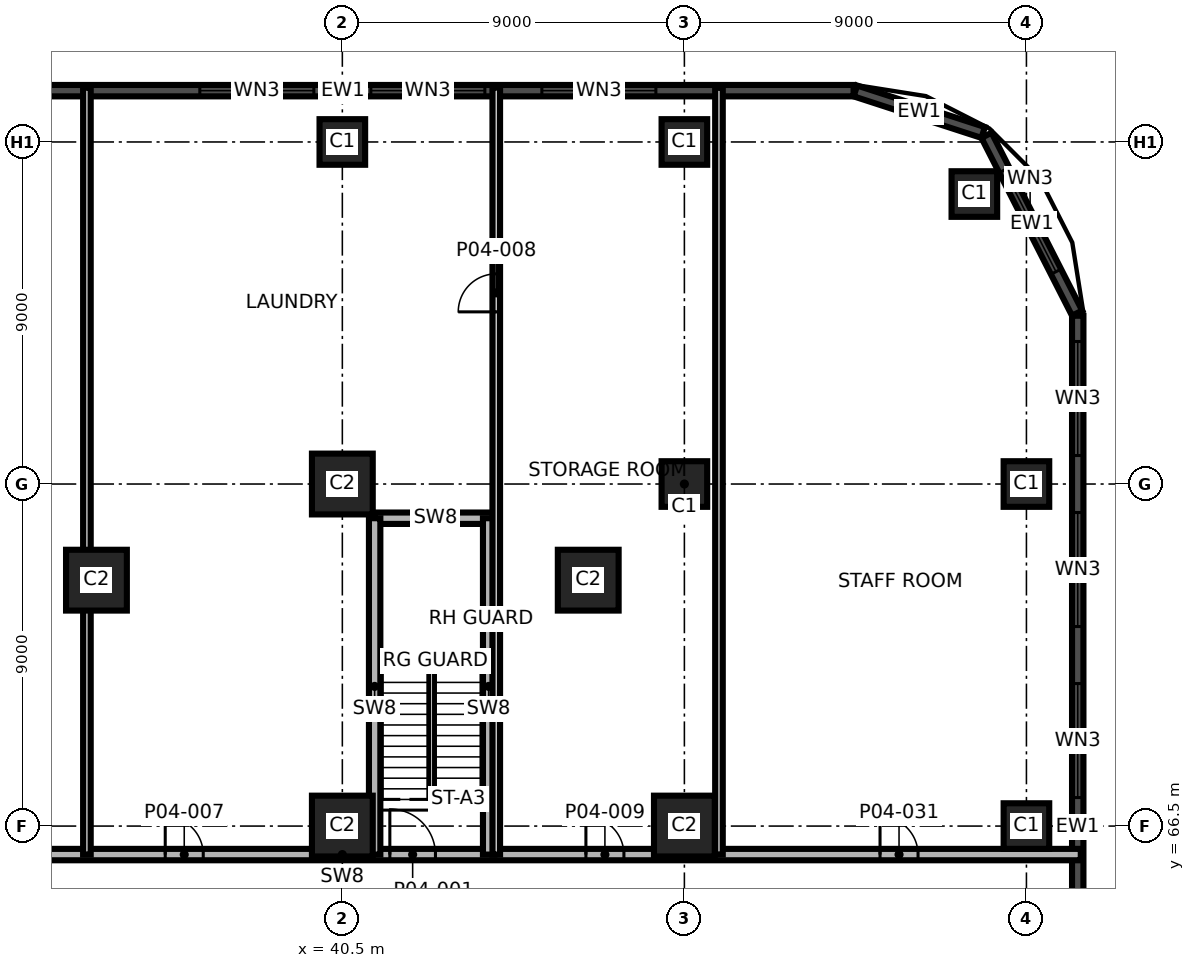
"""IFC4 building model, lengths in metres.
Left out: names, types, materials, properties, quantities, classifications, styles, units other than length and angle.
Written with IfcOpenShell. Run it as: python <this file> out.ifc"""

import sys

from ifc_helpers import new_model, si_unit, direction, frame, frame_2d, origin, origin_2d, place, context, subcontext, project, spatial, rectangle, extrude, element, fill, save


model = new_model("IFC4")
c1 = context("Model", 3, precision=1e-05, world=origin(), true_north=direction((0.0, 1.0)))
c2 = subcontext(c1, "Body", "Model", "MODEL_VIEW")
j1 = project(units=[si_unit("LENGTHUNIT", "METRE"), si_unit("PLANEANGLEUNIT", "RADIAN")], contexts=[c1])
p1 = place(None, origin())
s1 = spatial("IfcSite", under=j1, at=p1, CompositionType="ELEMENT")
p2 = place(p1, origin())
s2 = spatial("IfcBuilding", under=s1, at=p2, CompositionType="ELEMENT")
p3 = place(p2, frame((0.0, 0.0, 23.5)))
s3 = spatial("IfcBuildingStorey", under=s2, at=p3, CompositionType="ELEMENT", Elevation=23.5)
for number, where, z_axis, x_axis in (
    (1, (40.5, 66.5, 0.0), (0.0, 0.0, 1.0), (1.0, 0.0, 0.0)),
    (2, (49.5, 66.5, 0.0), (0.0, 0.0, 1.0), (1.0, 0.0, 0.0)),
):
    element("IfcColumn", number, at=place(p3, frame(where, z_axis=z_axis, x_axis=x_axis)), inside=s3, PredefinedType="COLUMN", context=c2, shape_type="SweptSolid", body=[
        extrude(rectangle(XDim=1.6, YDim=1.6, at=origin_2d()), origin(), (0.0, 0.0, 1.0), 5.0),
    ])
p4 = place(p3, frame((58.5, 66.5, 0.0), z_axis=(0.0, 0.0, 1.0), x_axis=(1.0, 0.0, 0.0)))
e3 = element("IfcColumn", 3, at=p4, inside=s3, PredefinedType="COLUMN", context=c2, shape_type="SweptSolid", body=[
    extrude(rectangle(XDim=1.2, YDim=1.2, at=origin_2d()), origin(), (0.0, 0.0, 1.0), 5.0),
])
p5 = place(p3, frame((40.5, 75.5, 0.0), z_axis=(0.0, 0.0, 1.0), x_axis=(1.0, 0.0, 0.0)))
e4 = element("IfcColumn", 4, at=p5, inside=s3, PredefinedType="COLUMN", context=c2, shape_type="SweptSolid", body=[
    extrude(rectangle(XDim=1.6, YDim=1.6, at=origin_2d()), origin(), (0.0, 0.0, 1.0), 5.0),
])
for number, where, z_axis, x_axis in (
    (5, (49.5, 75.5, 0.0), (0.0, 0.0, 1.0), (1.0, 0.0, 0.0)),
    (6, (58.5, 75.5, 0.0), (0.0, 0.0, 1.0), (1.0, 0.0, 0.0)),
    (7, (57.13, 83.13, 0.0), (0.0, 0.0, 1.0), (1.0, 0.0, 0.0)),
    (8, (40.5, 84.5, 0.0), (0.0, 0.0, 1.0), (1.0, 0.0, 0.0)),
    (9, (49.5, 84.5, 0.0), (0.0, 0.0, 1.0), (1.0, 0.0, 0.0)),
):
    element("IfcColumn", number, at=place(p3, frame(where, z_axis=z_axis, x_axis=x_axis)), inside=s3, PredefinedType="COLUMN", context=c2, shape_type="SweptSolid", body=[
        extrude(rectangle(XDim=1.2, YDim=1.2, at=origin_2d()), origin(), (0.0, 0.0, 1.0), 5.0),
    ])
for number, where, z_axis, x_axis in (
    (10, (34.03, 72.97, 0.0), (0.0, 0.0, 1.0), (1.0, 0.0, 0.0)),
    (11, (46.97, 72.97, 0.0), (0.0, 0.0, 1.0), (1.0, 0.0, 0.0)),
):
    element("IfcColumn", number, at=place(p3, frame(where, z_axis=z_axis, x_axis=x_axis)), inside=s3, PredefinedType="COLUMN", context=c2, shape_type="SweptSolid", body=[
        extrude(rectangle(XDim=1.6, YDim=1.6, at=origin_2d()), origin(), (0.0, 0.0, 1.0), 5.0),
    ])
p6 = place(p3, frame((59.85, 53.0, 0.0), z_axis=(0.0, 0.0, 1.0), x_axis=(0.0, 1.0, 0.0)))
e12 = element("IfcWall", 12, at=p6, inside=s3, PredefinedType="SOLIDWALL", context=c2, shape_type="SweptSolid", body=[
    extrude(rectangle(XDim=26.928, YDim=0.3, at=frame_2d((13.464, 0.0))), origin(), (0.0, 0.0, 1.0), 4.7),
])
p7 = place(p6, frame((5.25, 0.0, 0.9)))
e13 = element("IfcOpeningElement", 13, at=p7, cuts=e12, PredefinedType="OPENING", context=c2, shape_type="SweptSolid", body=[
    extrude(rectangle(XDim=3.0, YDim=2.4, at=frame_2d((1.5, 1.2))), frame((0.0, 0.16, 0.0), z_axis=(0.0, -1.0, 0.0), x_axis=(1.0, 0.0, 0.0)), (0.0, 0.0, 1.0), 0.32),
])
p8 = place(p6, frame((14.25, 0.0, 0.9)))
e14 = element("IfcOpeningElement", 14, at=p8, cuts=e12, PredefinedType="OPENING", context=c2, shape_type="SweptSolid", body=[
    extrude(rectangle(XDim=3.0, YDim=2.4, at=frame_2d((1.5, 1.2))), frame((0.0, 0.16, 0.0), z_axis=(0.0, -1.0, 0.0), x_axis=(1.0, 0.0, 0.0)), (0.0, 0.0, 1.0), 0.32),
])
p9 = place(p6, frame((18.75, 0.0, 0.9)))
e15 = element("IfcOpeningElement", 15, at=p9, cuts=e12, PredefinedType="OPENING", context=c2, shape_type="SweptSolid", body=[
    extrude(rectangle(XDim=3.0, YDim=2.4, at=frame_2d((1.5, 1.2))), frame((0.0, 0.16, 0.0), z_axis=(0.0, -1.0, 0.0), x_axis=(1.0, 0.0, 0.0)), (0.0, 0.0, 1.0), 0.32),
])
p10 = place(p6, frame((23.25, 0.0, 0.9)))
e16 = element("IfcOpeningElement", 16, at=p10, cuts=e12, PredefinedType="OPENING", context=c2, shape_type="SweptSolid", body=[
    extrude(rectangle(XDim=3.0, YDim=2.4, at=frame_2d((1.5, 1.2))), frame((0.0, 0.16, 0.0), z_axis=(0.0, -1.0, 0.0), x_axis=(1.0, 0.0, 0.0)), (0.0, 0.0, 1.0), 0.32),
])
p11 = place(p3, frame((59.834, 79.996, 0.0), z_axis=(0.0, 0.0, 1.0), x_axis=(-0.454006562826, 0.890998339455, 0.0)))
e17 = element("IfcWall", 17, at=p11, inside=s3, PredefinedType="SOLIDWALL", context=c2, shape_type="SweptSolid", body=[
    extrude(rectangle(XDim=5.252, YDim=0.3, at=frame_2d((2.626, 0.0))), origin(), (0.0, 0.0, 1.0), 4.7),
])
p12 = place(p11, frame((1.224, 0.0, 0.9)))
e18 = element("IfcOpeningElement", 18, at=p12, cuts=e17, PredefinedType="OPENING", context=c2, shape_type="SweptSolid", body=[
    extrude(rectangle(XDim=3.0, YDim=2.4, at=frame_2d((1.5, 1.2))), frame((0.0, 0.16, 0.0), z_axis=(0.0, -1.0, 0.0), x_axis=(1.0, 0.0, 0.0)), (0.0, 0.0, 1.0), 0.32),
])
p13 = place(p3, frame((57.362, 84.75, 0.0), z_axis=(0.0, 0.0, 1.0), x_axis=(-0.951038127287, 0.309073584194, 0.0)))
e19 = element("IfcWall", 19, at=p13, inside=s3, PredefinedType="SOLIDWALL", context=c2, shape_type="SweptSolid", body=[
    extrude(rectangle(XDim=3.536, YDim=0.3, at=frame_2d((1.768, 0.0))), origin(), (0.0, 0.0, 1.0), 4.7),
])
p14 = place(p3, frame((53.952, 85.85, 0.0), z_axis=(0.0, 0.0, 1.0), x_axis=(-1.0, 0.0, 0.0)))
e20 = element("IfcWall", 20, at=p14, inside=s3, PredefinedType="SOLIDWALL", context=c2, shape_type="SweptSolid", body=[
    extrude(rectangle(XDim=26.88, YDim=0.3, at=frame_2d((13.44, 0.0))), origin(), (0.0, 0.0, 1.0), 4.7),
])
p15 = place(p14, frame((5.202, 0.0, 0.9)))
e21 = element("IfcOpeningElement", 21, at=p15, cuts=e20, PredefinedType="OPENING", context=c2, shape_type="SweptSolid", body=[
    extrude(rectangle(XDim=3.0, YDim=2.4, at=frame_2d((1.5, 1.2))), frame((0.0, 0.16, 0.0), z_axis=(0.0, -1.0, 0.0), x_axis=(1.0, 0.0, 0.0)), (0.0, 0.0, 1.0), 0.32),
])
p16 = place(p14, frame((9.702, 0.0, 0.9)))
e22 = element("IfcOpeningElement", 22, at=p16, cuts=e20, PredefinedType="OPENING", context=c2, shape_type="SweptSolid", body=[
    extrude(rectangle(XDim=3.0, YDim=2.4, at=frame_2d((1.5, 1.2))), frame((0.0, 0.16, 0.0), z_axis=(0.0, -1.0, 0.0), x_axis=(1.0, 0.0, 0.0)), (0.0, 0.0, 1.0), 0.32),
])
p17 = place(p14, frame((14.202, 0.0, 0.9)))
e23 = element("IfcOpeningElement", 23, at=p17, cuts=e20, PredefinedType="OPENING", context=c2, shape_type="SweptSolid", body=[
    extrude(rectangle(XDim=3.0, YDim=2.4, at=frame_2d((1.5, 1.2))), frame((0.0, 0.16, 0.0), z_axis=(0.0, -1.0, 0.0), x_axis=(1.0, 0.0, 0.0)), (0.0, 0.0, 1.0), 0.32),
])
p18 = place(p14, frame((23.226, 0.0, 0.9)))
e24 = element("IfcOpeningElement", 24, at=p18, cuts=e20, PredefinedType="OPENING", context=c2, shape_type="SweptSolid", body=[
    extrude(rectangle(XDim=3.0, YDim=2.4, at=frame_2d((1.5, 1.2))), frame((0.0, 0.16, 0.0), z_axis=(0.0, -1.0, 0.0), x_axis=(1.0, 0.0, 0.0)), (0.0, 0.0, 1.0), 0.32),
])
p19 = place(p3, frame((21.07, 65.75, 0.0), z_axis=(0.0, 0.0, 1.0), x_axis=(1.0, 0.0, 0.0)))
e25 = element("IfcWall", 25, at=p19, inside=s3, PredefinedType="SHEAR", context=c2, shape_type="SweptSolid", body=[
    extrude(rectangle(XDim=38.86, YDim=0.3, at=frame_2d((19.43, 0.0))), origin(), (0.0, 0.0, 1.0), 4.7),
])
p20 = place(p19, frame((20.68, 0.0, 0.0)))
e26 = element("IfcOpeningElement", 26, at=p20, cuts=e25, PredefinedType="OPENING", context=c2, shape_type="SweptSolid", body=[
    extrude(rectangle(XDim=1.2, YDim=2.1, at=frame_2d((0.6, 1.05))), frame((0.0, 0.16, 0.0), z_axis=(0.0, -1.0, 0.0), x_axis=(1.0, 0.0, 0.0)), (0.0, 0.0, 1.0), 0.32),
])
p21 = place(p19, frame((14.77, 0.0, 0.0)))
e27 = element("IfcOpeningElement", 27, at=p21, cuts=e25, PredefinedType="OPENING", context=c2, shape_type="SweptSolid", body=[
    extrude(rectangle(XDim=1.0, YDim=2.1, at=frame_2d((0.5, 1.05))), frame((0.0, 0.16, 0.0), z_axis=(0.0, -1.0, 0.0), x_axis=(1.0, 0.0, 0.0)), (0.0, 0.0, 1.0), 0.32),
])
p22 = place(p19, frame((25.839, 0.0, 0.0)))
e28 = element("IfcOpeningElement", 28, at=p22, cuts=e25, PredefinedType="OPENING", context=c2, shape_type="SweptSolid", body=[
    extrude(rectangle(XDim=1.0, YDim=2.1, at=frame_2d((0.5, 1.05))), frame((0.0, 0.16, 0.0), z_axis=(0.0, -1.0, 0.0), x_axis=(1.0, 0.0, 0.0)), (0.0, 0.0, 1.0), 0.32),
])
p23 = place(p19, frame((5.781, 0.0, 0.0)))
e29 = element("IfcOpeningElement", 29, at=p23, cuts=e25, PredefinedType="OPENING", context=c2, shape_type="SweptSolid", body=[
    extrude(rectangle(XDim=1.0, YDim=2.1, at=frame_2d((0.5, 1.05))), frame((0.0, 0.16, 0.0), z_axis=(0.0, -1.0, 0.0), x_axis=(1.0, 0.0, 0.0)), (0.0, 0.0, 1.0), 0.32),
])
p24 = place(p19, frame((33.578, 0.0, 0.0)))
e30 = element("IfcOpeningElement", 30, at=p24, cuts=e25, PredefinedType="OPENING", context=c2, shape_type="SweptSolid", body=[
    extrude(rectangle(XDim=1.0, YDim=2.1, at=frame_2d((0.5, 1.05))), frame((0.0, 0.16, 0.0), z_axis=(0.0, -1.0, 0.0), x_axis=(1.0, 0.0, 0.0)), (0.0, 0.0, 1.0), 0.32),
])
p25 = place(p3, frame((41.35, 74.6, 0.0), z_axis=(0.0, 0.0, 1.0), x_axis=(1.0, 0.0, 0.0)))
e31 = element("IfcWall", 31, at=p25, inside=s3, PredefinedType="SHEAR", context=c2, shape_type="SweptSolid", body=[
    extrude(rectangle(XDim=3.2, YDim=0.3, at=frame_2d((1.6, 0.0))), origin(), (0.0, 0.0, 1.0), 4.7),
])
p26 = place(p3, frame((33.779, 65.75, 0.0), z_axis=(0.0, 0.0, 1.0), x_axis=(0.0, 1.0, 0.0)))
e32 = element("IfcWall", 32, at=p26, inside=s3, PredefinedType="PARTITIONING", context=c2, shape_type="SweptSolid", body=[
    extrude(rectangle(XDim=20.18, YDim=0.2, at=frame_2d((10.09, 0.0))), origin(), (0.0, 0.0, 1.0), 4.7),
])
for number, where, z_axis, x_axis in (
    (33, (41.35, 65.75, 0.0), (0.0, 0.0, 1.0), (0.0, 1.0, 0.0)),
    (34, (44.35, 65.75, 0.0), (0.0, 0.0, 1.0), (0.0, 1.0, 0.0)),
):
    element("IfcWall", number, at=place(p3, frame(where, z_axis=z_axis, x_axis=x_axis)), inside=s3, PredefinedType="SHEAR", context=c2, shape_type="SweptSolid", body=[
        extrude(rectangle(XDim=8.85, YDim=0.3, at=frame_2d((4.425, 0.0))), origin(), (0.0, 0.0, 1.0), 4.7),
    ])
p27 = place(p3, frame((44.55, 65.75, 0.0), z_axis=(0.0, 0.0, 1.0), x_axis=(0.0, 1.0, 0.0)))
e35 = element("IfcWall", 35, at=p27, inside=s3, PredefinedType="PARTITIONING", context=c2, shape_type="SweptSolid", body=[
    extrude(rectangle(XDim=20.18, YDim=0.2, at=frame_2d((10.09, 0.0))), origin(), (0.0, 0.0, 1.0), 4.7),
])
p28 = place(p27, frame((14.28, 0.0, 0.0)))
e36 = element("IfcOpeningElement", 36, at=p28, cuts=e35, PredefinedType="OPENING", context=c2, shape_type="SweptSolid", body=[
    extrude(rectangle(XDim=1.0, YDim=2.1, at=frame_2d((0.5, 1.05))), frame((0.0, 0.11, 0.0), z_axis=(0.0, -1.0, 0.0), x_axis=(1.0, 0.0, 0.0)), (0.0, 0.0, 1.0), 0.22),
])
p29 = place(p3, frame((50.41, 65.75, 0.0), z_axis=(0.0, 0.0, 1.0), x_axis=(0.0, 1.0, 0.0)))
e37 = element("IfcWall", 37, at=p29, inside=s3, PredefinedType="PARTITIONING", context=c2, shape_type="SweptSolid", body=[
    extrude(rectangle(XDim=20.18, YDim=0.2, at=frame_2d((10.09, 0.0))), origin(), (0.0, 0.0, 1.0), 4.7),
])
p30 = place(p8, origin())
e38 = element("IfcWindow", 38, at=p30, inside=s3, PartitioningType="SINGLE_PANEL", PredefinedType="WINDOW", context=c2, shape_type="SweptSolid", body=[
    extrude(rectangle(XDim=3.0, YDim=2.4, at=frame_2d((1.5, 1.2))), frame((0.0, 0.03, 0.0), z_axis=(0.0, -1.0, 0.0), x_axis=(1.0, 0.0, 0.0)), (0.0, 0.0, 1.0), 0.06),
])
fill(e14, e38)
p31 = place(p9, origin())
e39 = element("IfcWindow", 39, at=p31, inside=s3, PartitioningType="SINGLE_PANEL", PredefinedType="WINDOW", context=c2, shape_type="SweptSolid", body=[
    extrude(rectangle(XDim=3.0, YDim=2.4, at=frame_2d((1.5, 1.2))), frame((0.0, 0.03, 0.0), z_axis=(0.0, -1.0, 0.0), x_axis=(1.0, 0.0, 0.0)), (0.0, 0.0, 1.0), 0.06),
])
fill(e15, e39)
p32 = place(p10, origin())
e40 = element("IfcWindow", 40, at=p32, inside=s3, PartitioningType="SINGLE_PANEL", PredefinedType="WINDOW", context=c2, shape_type="SweptSolid", body=[
    extrude(rectangle(XDim=3.0, YDim=2.4, at=frame_2d((1.5, 1.2))), frame((0.0, 0.03, 0.0), z_axis=(0.0, -1.0, 0.0), x_axis=(1.0, 0.0, 0.0)), (0.0, 0.0, 1.0), 0.06),
])
fill(e16, e40)
p33 = place(p12, origin())
e41 = element("IfcWindow", 41, at=p33, inside=s3, PartitioningType="SINGLE_PANEL", PredefinedType="WINDOW", context=c2, shape_type="SweptSolid", body=[
    extrude(rectangle(XDim=3.0, YDim=2.4, at=frame_2d((1.5, 1.2))), frame((0.0, 0.03, 0.0), z_axis=(0.0, -1.0, 0.0), x_axis=(1.0, 0.0, 0.0)), (0.0, 0.0, 1.0), 0.06),
])
fill(e18, e41)
p34 = place(p15, origin())
e42 = element("IfcWindow", 42, at=p34, inside=s3, PartitioningType="SINGLE_PANEL", PredefinedType="WINDOW", context=c2, shape_type="SweptSolid", body=[
    extrude(rectangle(XDim=3.0, YDim=2.4, at=frame_2d((1.5, 1.2))), frame((0.0, 0.03, 0.0), z_axis=(0.0, -1.0, 0.0), x_axis=(1.0, 0.0, 0.0)), (0.0, 0.0, 1.0), 0.06),
])
fill(e21, e42)
p35 = place(p16, origin())
e43 = element("IfcWindow", 43, at=p35, inside=s3, PartitioningType="SINGLE_PANEL", PredefinedType="WINDOW", context=c2, shape_type="SweptSolid", body=[
    extrude(rectangle(XDim=3.0, YDim=2.4, at=frame_2d((1.5, 1.2))), frame((0.0, 0.03, 0.0), z_axis=(0.0, -1.0, 0.0), x_axis=(1.0, 0.0, 0.0)), (0.0, 0.0, 1.0), 0.06),
])
fill(e22, e43)
p36 = place(p17, origin())
e44 = element("IfcWindow", 44, at=p36, inside=s3, PartitioningType="SINGLE_PANEL", PredefinedType="WINDOW", context=c2, shape_type="SweptSolid", body=[
    extrude(rectangle(XDim=3.0, YDim=2.4, at=frame_2d((1.5, 1.2))), frame((0.0, 0.03, 0.0), z_axis=(0.0, -1.0, 0.0), x_axis=(1.0, 0.0, 0.0)), (0.0, 0.0, 1.0), 0.06),
])
fill(e23, e44)
p37 = place(p20, origin())
e45 = element("IfcDoor", 45, at=p37, inside=s3, OperationType="SINGLE_SWING_LEFT", PredefinedType="DOOR", context=c2, shape_type="SweptSolid", body=[
    extrude(rectangle(XDim=1.2, YDim=2.1, at=frame_2d((0.6, 1.05))), frame((0.0, 0.025, 0.0), z_axis=(0.0, -1.0, 0.0), x_axis=(1.0, 0.0, 0.0)), (0.0, 0.0, 1.0), 0.05),
])
fill(e26, e45)
p38 = place(p21, origin())
e46 = element("IfcDoor", 46, at=p38, inside=s3, OperationType="SINGLE_SWING_LEFT", PredefinedType="DOOR", context=c2, shape_type="SweptSolid", body=[
    extrude(rectangle(XDim=1.0, YDim=2.1, at=frame_2d((0.5, 1.05))), frame((0.0, 0.025, 0.0), z_axis=(0.0, -1.0, 0.0), x_axis=(1.0, 0.0, 0.0)), (0.0, 0.0, 1.0), 0.05),
])
fill(e27, e46)
p39 = place(p28, origin())
e47 = element("IfcDoor", 47, at=p39, inside=s3, OperationType="SINGLE_SWING_RIGHT", PredefinedType="DOOR", context=c2, shape_type="SweptSolid", body=[
    extrude(rectangle(XDim=1.0, YDim=2.1, at=frame_2d((0.5, 1.05))), frame((0.0, 0.025, 0.0), z_axis=(0.0, -1.0, 0.0), x_axis=(1.0, 0.0, 0.0)), (0.0, 0.0, 1.0), 0.05),
])
fill(e36, e47)
p40 = place(p22, origin())
e48 = element("IfcDoor", 48, at=p40, inside=s3, OperationType="SINGLE_SWING_LEFT", PredefinedType="DOOR", context=c2, shape_type="SweptSolid", body=[
    extrude(rectangle(XDim=1.0, YDim=2.1, at=frame_2d((0.5, 1.05))), frame((0.0, 0.025, 0.0), z_axis=(0.0, -1.0, 0.0), x_axis=(1.0, 0.0, 0.0)), (0.0, 0.0, 1.0), 0.05),
])
fill(e28, e48)
p41 = place(p24, origin())
e49 = element("IfcDoor", 49, at=p41, inside=s3, OperationType="SINGLE_SWING_LEFT", PredefinedType="DOOR", context=c2, shape_type="SweptSolid", body=[
    extrude(rectangle(XDim=1.0, YDim=2.1, at=frame_2d((0.5, 1.05))), frame((0.0, 0.025, 0.0), z_axis=(0.0, -1.0, 0.0), x_axis=(1.0, 0.0, 0.0)), (0.0, 0.0, 1.0), 0.05),
])
fill(e30, e49)
save(model, sys.argv[1])
